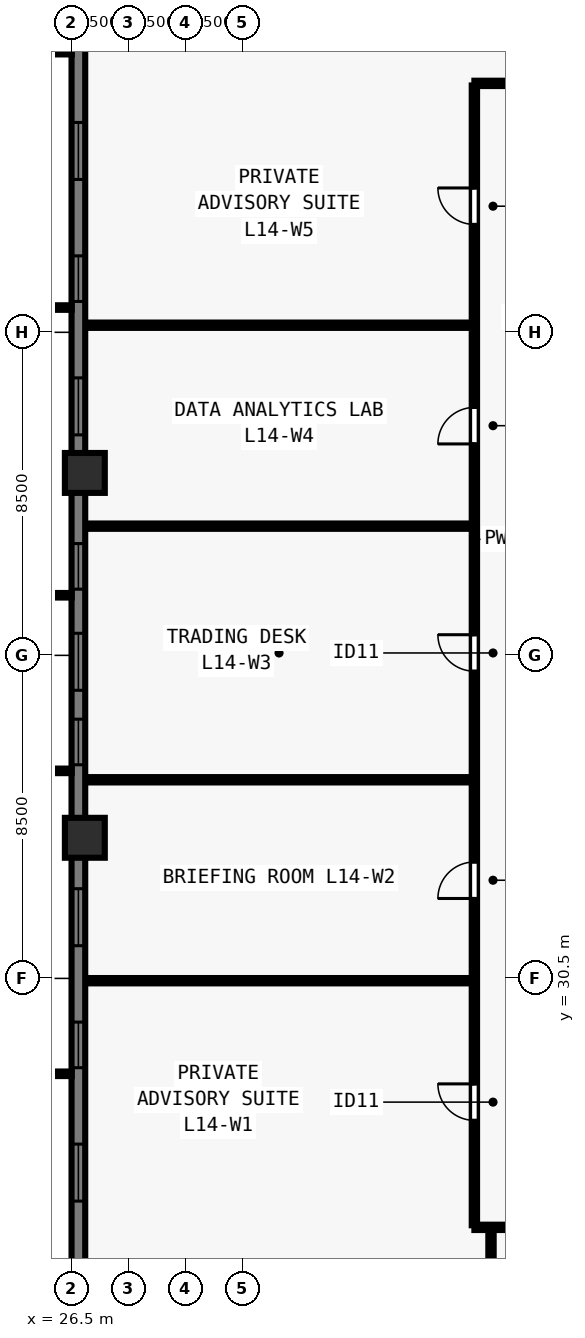
"""IFC4 building model, lengths in metres.
Left out: names, types, materials, properties, quantities, classifications, styles, units other than length and angle.
Written with IfcOpenShell. Run it as: python <this file> out.ifc"""

import sys

from ifc_helpers import new_model, si_unit, direction, frame, frame_2d, origin, origin_2d, place, context, subcontext, project, spatial, rectangle, extrude, element, fill, save


model = new_model("IFC4")
c1 = context("Model", 3, precision=1e-05, world=origin(), true_north=direction((0.0, 1.0)))
c2 = subcontext(c1, "Body", "Model", "MODEL_VIEW")
j1 = project(units=[si_unit("LENGTHUNIT", "METRE"), si_unit("PLANEANGLEUNIT", "RADIAN")], contexts=[c1])
p1 = place(None, origin())
s1 = spatial("IfcSite", under=j1, at=p1, CompositionType="ELEMENT")
p2 = place(p1, origin())
s2 = spatial("IfcBuilding", under=s1, at=p2, CompositionType="ELEMENT")
p3 = place(p2, frame((0.0, 0.0, 55.0)))
s3 = spatial("IfcBuildingStorey", under=s2, at=p3, CompositionType="ELEMENT", Elevation=55.0)
for number, where, z_axis, x_axis in (
    (1, (26.85, 43.8, 0.0), (0.0, 0.0, 1.0), (0.0, 1.0, 0.0)),
    (2, (26.85, 34.2, 0.0), (0.0, 0.0, 1.0), (0.0, 1.0, 0.0)),
):
    element("IfcColumn", number, at=place(p3, frame(where, z_axis=z_axis, x_axis=x_axis)), inside=s3, PredefinedType="COLUMN", context=c2, shape_type="SweptSolid", body=[
        extrude(rectangle(XDim=1.05, YDim=1.05, at=origin_2d()), origin(), (0.0, 0.0, 1.0), 3.5),
    ])
p4 = place(p3, frame((26.68, 16.5, 0.0), z_axis=(0.0, 0.0, 1.0), x_axis=(0.0, 1.0, 0.0)))
e3 = element("IfcWall", 3, at=p4, inside=s3, PredefinedType="SOLIDWALL", context=c2, shape_type="SweptSolid", body=[
    extrude(rectangle(XDim=44.662, YDim=0.36, at=frame_2d((22.331, 0.0))), origin(), (0.0, 0.0, 1.0), 3.28),
])
p5 = place(p4, frame((4.93, 0.0, 0.8)))
e4 = element("IfcOpeningElement", 4, at=p5, cuts=e3, PredefinedType="OPENING", context=c2, shape_type="SweptSolid", body=[
    extrude(rectangle(XDim=1.2, YDim=1.544, at=frame_2d((0.6, 0.772))), frame((0.0, 0.19, 0.0), z_axis=(0.0, -1.0, 0.0), x_axis=(1.0, 0.0, 0.0)), (0.0, 0.0, 1.0), 0.38),
])
p6 = place(p4, frame((8.14, 0.0, 0.8)))
e5 = element("IfcOpeningElement", 5, at=p6, cuts=e3, PredefinedType="OPENING", context=c2, shape_type="SweptSolid", body=[
    extrude(rectangle(XDim=1.5, YDim=1.544, at=frame_2d((0.75, 0.772))), frame((0.0, 0.19, 0.0), z_axis=(0.0, -1.0, 0.0), x_axis=(1.0, 0.0, 0.0)), (0.0, 0.0, 1.0), 0.38),
])
p7 = place(p4, frame((11.65, 0.0, 0.8)))
e6 = element("IfcOpeningElement", 6, at=p7, cuts=e3, PredefinedType="OPENING", context=c2, shape_type="SweptSolid", body=[
    extrude(rectangle(XDim=1.2, YDim=1.544, at=frame_2d((0.6, 0.772))), frame((0.0, 0.19, 0.0), z_axis=(0.0, -1.0, 0.0), x_axis=(1.0, 0.0, 0.0)), (0.0, 0.0, 1.0), 0.38),
])
p8 = place(p4, frame((14.861, 0.0, 0.8)))
e7 = element("IfcOpeningElement", 7, at=p8, cuts=e3, PredefinedType="OPENING", context=c2, shape_type="SweptSolid", body=[
    extrude(rectangle(XDim=1.5, YDim=1.544, at=frame_2d((0.75, 0.772))), frame((0.0, 0.19, 0.0), z_axis=(0.0, -1.0, 0.0), x_axis=(1.0, 0.0, 0.0)), (0.0, 0.0, 1.0), 0.38),
])
p9 = place(p4, frame((19.621, 0.0, 0.8)))
e8 = element("IfcOpeningElement", 8, at=p9, cuts=e3, PredefinedType="OPENING", context=c2, shape_type="SweptSolid", body=[
    extrude(rectangle(XDim=1.2, YDim=1.544, at=frame_2d((0.6, 0.772))), frame((0.0, 0.19, 0.0), z_axis=(0.0, -1.0, 0.0), x_axis=(1.0, 0.0, 0.0)), (0.0, 0.0, 1.0), 0.38),
])
p10 = place(p4, frame((21.581, 0.0, 0.8)))
e9 = element("IfcOpeningElement", 9, at=p10, cuts=e3, PredefinedType="OPENING", context=c2, shape_type="SweptSolid", body=[
    extrude(rectangle(XDim=1.5, YDim=1.544, at=frame_2d((0.75, 0.772))), frame((0.0, 0.19, 0.0), z_axis=(0.0, -1.0, 0.0), x_axis=(1.0, 0.0, 0.0)), (0.0, 0.0, 1.0), 0.38),
])
p11 = place(p4, frame((24.241, 0.0, 0.8)))
e10 = element("IfcOpeningElement", 10, at=p11, cuts=e3, PredefinedType="OPENING", context=c2, shape_type="SweptSolid", body=[
    extrude(rectangle(XDim=1.2, YDim=1.544, at=frame_2d((0.6, 0.772))), frame((0.0, 0.19, 0.0), z_axis=(0.0, -1.0, 0.0), x_axis=(1.0, 0.0, 0.0)), (0.0, 0.0, 1.0), 0.38),
])
p12 = place(p4, frame((28.302, 0.0, 0.8)))
e11 = element("IfcOpeningElement", 11, at=p12, cuts=e3, PredefinedType="OPENING", context=c2, shape_type="SweptSolid", body=[
    extrude(rectangle(XDim=1.5, YDim=1.544, at=frame_2d((0.75, 0.772))), frame((0.0, 0.19, 0.0), z_axis=(0.0, -1.0, 0.0), x_axis=(1.0, 0.0, 0.0)), (0.0, 0.0, 1.0), 0.38),
])
p13 = place(p4, frame((31.812, 0.0, 0.8)))
e12 = element("IfcOpeningElement", 12, at=p13, cuts=e3, PredefinedType="OPENING", context=c2, shape_type="SweptSolid", body=[
    extrude(rectangle(XDim=1.2, YDim=1.544, at=frame_2d((0.6, 0.772))), frame((0.0, 0.19, 0.0), z_axis=(0.0, -1.0, 0.0), x_axis=(1.0, 0.0, 0.0)), (0.0, 0.0, 1.0), 0.38),
])
p14 = place(p4, frame((35.022, 0.0, 0.8)))
e13 = element("IfcOpeningElement", 13, at=p14, cuts=e3, PredefinedType="OPENING", context=c2, shape_type="SweptSolid", body=[
    extrude(rectangle(XDim=1.5, YDim=1.544, at=frame_2d((0.75, 0.772))), frame((0.0, 0.19, 0.0), z_axis=(0.0, -1.0, 0.0), x_axis=(1.0, 0.0, 0.0)), (0.0, 0.0, 1.0), 0.38),
])
p15 = place(p4, frame((38.532, 0.0, 0.8)))
e14 = element("IfcOpeningElement", 14, at=p15, cuts=e3, PredefinedType="OPENING", context=c2, shape_type="SweptSolid", body=[
    extrude(rectangle(XDim=1.2, YDim=1.544, at=frame_2d((0.6, 0.772))), frame((0.0, 0.19, 0.0), z_axis=(0.0, -1.0, 0.0), x_axis=(1.0, 0.0, 0.0)), (0.0, 0.0, 1.0), 0.38),
])
p16 = place(p3, frame((37.1, 23.95, 0.0), z_axis=(0.0, 0.0, 1.0), x_axis=(1.0, 0.0, 0.0)))
e15 = element("IfcWall", 15, at=p16, inside=s3, PredefinedType="PARTITIONING", context=c2, shape_type="SweptSolid", body=[
    extrude(rectangle(XDim=29.8, YDim=0.14, at=frame_2d((14.9, 0.0))), origin(), (0.0, 0.0, 1.0), 3.28),
])
p17 = place(p16, frame((4.191, 0.0, 0.0)))
e16 = element("IfcOpeningElement", 16, at=p17, cuts=e15, PredefinedType="OPENING", context=c2, shape_type="SweptSolid", body=[
    extrude(rectangle(XDim=0.96, YDim=2.12, at=frame_2d((0.48, 1.06))), frame((0.0, 0.08, 0.0), z_axis=(0.0, -1.0, 0.0), x_axis=(1.0, 0.0, 0.0)), (0.0, 0.0, 1.0), 0.16),
])
p18 = place(p16, frame((5.358, 0.0, 0.0)))
e17 = element("IfcOpeningElement", 17, at=p18, cuts=e15, PredefinedType="OPENING", context=c2, shape_type="SweptSolid", body=[
    extrude(rectangle(XDim=0.96, YDim=2.12, at=frame_2d((0.48, 1.06))), frame((0.0, 0.08, 0.0), z_axis=(0.0, -1.0, 0.0), x_axis=(1.0, 0.0, 0.0)), (0.0, 0.0, 1.0), 0.16),
])
p19 = place(p16, frame((14.51, 0.0, 0.0)))
e18 = element("IfcOpeningElement", 18, at=p19, cuts=e15, PredefinedType="OPENING", context=c2, shape_type="SweptSolid", body=[
    extrude(rectangle(XDim=0.96, YDim=2.12, at=frame_2d((0.48, 1.06))), frame((0.0, 0.08, 0.0), z_axis=(0.0, -1.0, 0.0), x_axis=(1.0, 0.0, 0.0)), (0.0, 0.0, 1.0), 0.16),
])
p20 = place(p16, frame((24.542, 0.0, 0.0)))
e19 = element("IfcOpeningElement", 19, at=p20, cuts=e15, PredefinedType="OPENING", context=c2, shape_type="SweptSolid", body=[
    extrude(rectangle(XDim=0.96, YDim=2.12, at=frame_2d((0.48, 1.06))), frame((0.0, 0.08, 0.0), z_axis=(0.0, -1.0, 0.0), x_axis=(1.0, 0.0, 0.0)), (0.0, 0.0, 1.0), 0.16),
])
p21 = place(p16, frame((28.26, 0.0, 0.0)))
e20 = element("IfcOpeningElement", 20, at=p21, cuts=e15, PredefinedType="OPENING", context=c2, shape_type="SweptSolid", body=[
    extrude(rectangle(XDim=0.96, YDim=2.12, at=frame_2d((0.48, 1.06))), frame((0.0, 0.08, 0.0), z_axis=(0.0, -1.0, 0.0), x_axis=(1.0, 0.0, 0.0)), (0.0, 0.0, 1.0), 0.16),
])
p22 = place(p3, frame((37.1, 54.05, 0.0), z_axis=(0.0, 0.0, 1.0), x_axis=(1.0, 0.0, 0.0)))
e21 = element("IfcWall", 21, at=p22, inside=s3, PredefinedType="PARTITIONING", context=c2, shape_type="SweptSolid", body=[
    extrude(rectangle(XDim=29.8, YDim=0.14, at=frame_2d((14.9, 0.0))), origin(), (0.0, 0.0, 1.0), 3.28),
])
p23 = place(p22, frame((3.522, 0.0, 0.0)))
e22 = element("IfcOpeningElement", 22, at=p23, cuts=e21, PredefinedType="OPENING", context=c2, shape_type="SweptSolid", body=[
    extrude(rectangle(XDim=0.96, YDim=2.12, at=frame_2d((0.48, 1.06))), frame((0.0, 0.08, 0.0), z_axis=(0.0, -1.0, 0.0), x_axis=(1.0, 0.0, 0.0)), (0.0, 0.0, 1.0), 0.16),
])
p24 = place(p22, frame((8.06, 0.0, 0.0)))
e23 = element("IfcOpeningElement", 23, at=p24, cuts=e21, PredefinedType="OPENING", context=c2, shape_type="SweptSolid", body=[
    extrude(rectangle(XDim=0.96, YDim=2.12, at=frame_2d((0.48, 1.06))), frame((0.0, 0.08, 0.0), z_axis=(0.0, -1.0, 0.0), x_axis=(1.0, 0.0, 0.0)), (0.0, 0.0, 1.0), 0.16),
])
p25 = place(p22, frame((20.6, 0.0, 0.0)))
e24 = element("IfcOpeningElement", 24, at=p25, cuts=e21, PredefinedType="OPENING", context=c2, shape_type="SweptSolid", body=[
    extrude(rectangle(XDim=0.96, YDim=2.12, at=frame_2d((0.48, 1.06))), frame((0.0, 0.08, 0.0), z_axis=(0.0, -1.0, 0.0), x_axis=(1.0, 0.0, 0.0)), (0.0, 0.0, 1.0), 0.16),
])
p26 = place(p22, frame((28.48, 0.0, 0.0)))
e25 = element("IfcOpeningElement", 25, at=p26, cuts=e21, PredefinedType="OPENING", context=c2, shape_type="SweptSolid", body=[
    extrude(rectangle(XDim=0.96, YDim=2.12, at=frame_2d((0.48, 1.06))), frame((0.0, 0.08, 0.0), z_axis=(0.0, -1.0, 0.0), x_axis=(1.0, 0.0, 0.0)), (0.0, 0.0, 1.0), 0.16),
])
p27 = place(p3, frame((37.1, 24.005, 0.0), z_axis=(0.0, 0.0, 1.0), x_axis=(0.0, 1.0, 0.0)))
e26 = element("IfcWall", 26, at=p27, inside=s3, PredefinedType="PARTITIONING", context=c2, shape_type="SweptSolid", body=[
    extrude(rectangle(XDim=29.99, YDim=0.14, at=frame_2d((14.995, 0.0))), origin(), (0.0, 0.0, 1.0), 3.28),
])
p28 = place(p27, frame((2.76, 0.0, 0.0)))
e27 = element("IfcOpeningElement", 27, at=p28, cuts=e26, PredefinedType="OPENING", context=c2, shape_type="SweptSolid", body=[
    extrude(rectangle(XDim=0.96, YDim=2.12, at=frame_2d((0.48, 1.06))), frame((0.0, 0.08, 0.0), z_axis=(0.0, -1.0, 0.0), x_axis=(1.0, 0.0, 0.0)), (0.0, 0.0, 1.0), 0.16),
])
p29 = place(p27, frame((8.598, 0.0, 0.0)))
e28 = element("IfcOpeningElement", 28, at=p29, cuts=e26, PredefinedType="OPENING", context=c2, shape_type="SweptSolid", body=[
    extrude(rectangle(XDim=0.96, YDim=2.12, at=frame_2d((0.48, 1.06))), frame((0.0, 0.08, 0.0), z_axis=(0.0, -1.0, 0.0), x_axis=(1.0, 0.0, 0.0)), (0.0, 0.0, 1.0), 0.16),
])
p30 = place(p27, frame((14.578, 0.0, 0.0)))
e29 = element("IfcOpeningElement", 29, at=p30, cuts=e26, PredefinedType="OPENING", context=c2, shape_type="SweptSolid", body=[
    extrude(rectangle(XDim=0.96, YDim=2.12, at=frame_2d((0.48, 1.06))), frame((0.0, 0.08, 0.0), z_axis=(0.0, -1.0, 0.0), x_axis=(1.0, 0.0, 0.0)), (0.0, 0.0, 1.0), 0.16),
])
p31 = place(p27, frame((20.558, 0.0, 0.0)))
e30 = element("IfcOpeningElement", 30, at=p31, cuts=e26, PredefinedType="OPENING", context=c2, shape_type="SweptSolid", body=[
    extrude(rectangle(XDim=0.96, YDim=2.12, at=frame_2d((0.48, 1.06))), frame((0.0, 0.08, 0.0), z_axis=(0.0, -1.0, 0.0), x_axis=(1.0, 0.0, 0.0)), (0.0, 0.0, 1.0), 0.16),
])
p32 = place(p27, frame((26.333, 0.0, 0.0)))
e31 = element("IfcOpeningElement", 31, at=p32, cuts=e26, PredefinedType="OPENING", context=c2, shape_type="SweptSolid", body=[
    extrude(rectangle(XDim=0.96, YDim=2.12, at=frame_2d((0.48, 1.06))), frame((0.0, 0.08, 0.0), z_axis=(0.0, -1.0, 0.0), x_axis=(1.0, 0.0, 0.0)), (0.0, 0.0, 1.0), 0.16),
])
p33 = place(p3, frame((37.537, 13.92, 0.0), z_axis=(0.0, 0.0, 1.0), x_axis=(0.0, 1.0, 0.0)))
e32 = element("IfcWall", 32, at=p33, inside=s3, PredefinedType="PARTITIONING", context=c2, shape_type="SweptSolid", body=[
    extrude(rectangle(XDim=9.93, YDim=0.14, at=frame_2d((4.965, 0.0))), origin(), (0.0, 0.0, 1.0), 2.439),
])
p34 = place(p3, frame((26.92, 30.439, 0.0), z_axis=(0.0, 0.0, 1.0), x_axis=(1.0, 0.0, 0.0)))
e33 = element("IfcWall", 33, at=p34, inside=s3, PredefinedType="PARTITIONING", context=c2, shape_type="SweptSolid", body=[
    extrude(rectangle(XDim=10.08, YDim=0.14, at=frame_2d((5.04, 0.0))), origin(), (0.0, 0.0, 1.0), 3.28),
])
p35 = place(p3, frame((26.92, 35.727, 0.0), z_axis=(0.0, 0.0, 1.0), x_axis=(1.0, 0.0, 0.0)))
e34 = element("IfcWall", 34, at=p35, inside=s3, PredefinedType="PARTITIONING", context=c2, shape_type="SweptSolid", body=[
    extrude(rectangle(XDim=10.08, YDim=0.14, at=frame_2d((5.04, 0.0))), origin(), (0.0, 0.0, 1.0), 2.849),
])
for number, where, z_axis, x_axis in (
    (35, (26.92, 42.399, 0.0), (0.0, 0.0, 1.0), (1.0, 0.0, 0.0)),
    (36, (26.92, 47.687, 0.0), (0.0, 0.0, 1.0), (1.0, 0.0, 0.0)),
):
    element("IfcWall", number, at=place(p3, frame(where, z_axis=z_axis, x_axis=x_axis)), inside=s3, PredefinedType="PARTITIONING", context=c2, shape_type="SweptSolid", body=[
        extrude(rectangle(XDim=10.08, YDim=0.14, at=frame_2d((5.04, 0.0))), origin(), (0.0, 0.0, 1.0), 3.28),
    ])
p36 = place(p6, origin())
e37 = element("IfcWindow", 37, at=p36, inside=s3, PartitioningType="SINGLE_PANEL", PredefinedType="WINDOW", context=c2, shape_type="SweptSolid", body=[
    extrude(rectangle(XDim=1.5, YDim=1.544, at=frame_2d((0.75, 0.772))), frame((0.0, -0.05, 0.0), z_axis=(0.0, -1.0, 0.0), x_axis=(1.0, 0.0, 0.0)), (0.0, 0.0, 1.0), 0.06),
])
fill(e5, e37)
p37 = place(p7, origin())
e38 = element("IfcWindow", 38, at=p37, inside=s3, PartitioningType="SINGLE_PANEL", PredefinedType="WINDOW", context=c2, shape_type="SweptSolid", body=[
    extrude(rectangle(XDim=1.2, YDim=1.544, at=frame_2d((0.6, 0.772))), frame((0.0, -0.05, 0.0), z_axis=(0.0, -1.0, 0.0), x_axis=(1.0, 0.0, 0.0)), (0.0, 0.0, 1.0), 0.06),
])
fill(e6, e38)
p38 = place(p8, origin())
e39 = element("IfcWindow", 39, at=p38, inside=s3, PartitioningType="SINGLE_PANEL", PredefinedType="WINDOW", context=c2, shape_type="SweptSolid", body=[
    extrude(rectangle(XDim=1.5, YDim=1.544, at=frame_2d((0.75, 0.772))), frame((0.0, -0.05, 0.0), z_axis=(0.0, -1.0, 0.0), x_axis=(1.0, 0.0, 0.0)), (0.0, 0.0, 1.0), 0.06),
])
fill(e7, e39)
p39 = place(p9, origin())
e40 = element("IfcWindow", 40, at=p39, inside=s3, PartitioningType="SINGLE_PANEL", PredefinedType="WINDOW", context=c2, shape_type="SweptSolid", body=[
    extrude(rectangle(XDim=1.2, YDim=1.544, at=frame_2d((0.6, 0.772))), frame((0.0, -0.05, 0.0), z_axis=(0.0, -1.0, 0.0), x_axis=(1.0, 0.0, 0.0)), (0.0, 0.0, 1.0), 0.06),
])
fill(e8, e40)
p40 = place(p10, origin())
e41 = element("IfcWindow", 41, at=p40, inside=s3, PartitioningType="SINGLE_PANEL", PredefinedType="WINDOW", context=c2, shape_type="SweptSolid", body=[
    extrude(rectangle(XDim=1.5, YDim=1.544, at=frame_2d((0.75, 0.772))), frame((0.0, -0.05, 0.0), z_axis=(0.0, -1.0, 0.0), x_axis=(1.0, 0.0, 0.0)), (0.0, 0.0, 1.0), 0.06),
])
fill(e9, e41)
p41 = place(p11, origin())
e42 = element("IfcWindow", 42, at=p41, inside=s3, PartitioningType="SINGLE_PANEL", PredefinedType="WINDOW", context=c2, shape_type="SweptSolid", body=[
    extrude(rectangle(XDim=1.2, YDim=1.544, at=frame_2d((0.6, 0.772))), frame((0.0, -0.05, 0.0), z_axis=(0.0, -1.0, 0.0), x_axis=(1.0, 0.0, 0.0)), (0.0, 0.0, 1.0), 0.06),
])
fill(e10, e42)
p42 = place(p12, origin())
e43 = element("IfcWindow", 43, at=p42, inside=s3, PartitioningType="SINGLE_PANEL", PredefinedType="WINDOW", context=c2, shape_type="SweptSolid", body=[
    extrude(rectangle(XDim=1.5, YDim=1.544, at=frame_2d((0.75, 0.772))), frame((0.0, -0.05, 0.0), z_axis=(0.0, -1.0, 0.0), x_axis=(1.0, 0.0, 0.0)), (0.0, 0.0, 1.0), 0.06),
])
fill(e11, e43)
p43 = place(p13, origin())
e44 = element("IfcWindow", 44, at=p43, inside=s3, PartitioningType="SINGLE_PANEL", PredefinedType="WINDOW", context=c2, shape_type="SweptSolid", body=[
    extrude(rectangle(XDim=1.2, YDim=1.544, at=frame_2d((0.6, 0.772))), frame((0.0, -0.05, 0.0), z_axis=(0.0, -1.0, 0.0), x_axis=(1.0, 0.0, 0.0)), (0.0, 0.0, 1.0), 0.06),
])
fill(e12, e44)
p44 = place(p14, origin())
e45 = element("IfcWindow", 45, at=p44, inside=s3, PartitioningType="SINGLE_PANEL", PredefinedType="WINDOW", context=c2, shape_type="SweptSolid", body=[
    extrude(rectangle(XDim=1.5, YDim=1.544, at=frame_2d((0.75, 0.772))), frame((0.0, -0.05, 0.0), z_axis=(0.0, -1.0, 0.0), x_axis=(1.0, 0.0, 0.0)), (0.0, 0.0, 1.0), 0.06),
])
fill(e13, e45)
p45 = place(p28, origin())
e46 = element("IfcDoor", 46, at=p45, inside=s3, OperationType="SINGLE_SWING_RIGHT", PredefinedType="DOOR", context=c2, shape_type="SweptSolid", body=[
    extrude(rectangle(XDim=0.96, YDim=2.12, at=frame_2d((0.48, 1.06))), frame((0.0, 0.025, 0.0), z_axis=(0.0, -1.0, 0.0), x_axis=(1.0, 0.0, 0.0)), (0.0, 0.0, 1.0), 0.05),
])
fill(e27, e46)
p46 = place(p29, origin())
e47 = element("IfcDoor", 47, at=p46, inside=s3, OperationType="SINGLE_SWING_LEFT", PredefinedType="DOOR", context=c2, shape_type="SweptSolid", body=[
    extrude(rectangle(XDim=0.96, YDim=2.12, at=frame_2d((0.48, 1.06))), frame((0.0, 0.025, 0.0), z_axis=(0.0, -1.0, 0.0), x_axis=(1.0, 0.0, 0.0)), (0.0, 0.0, 1.0), 0.05),
])
fill(e28, e47)
p47 = place(p30, origin())
e48 = element("IfcDoor", 48, at=p47, inside=s3, OperationType="SINGLE_SWING_RIGHT", PredefinedType="DOOR", context=c2, shape_type="SweptSolid", body=[
    extrude(rectangle(XDim=0.96, YDim=2.12, at=frame_2d((0.48, 1.06))), frame((0.0, 0.025, 0.0), z_axis=(0.0, -1.0, 0.0), x_axis=(1.0, 0.0, 0.0)), (0.0, 0.0, 1.0), 0.05),
])
fill(e29, e48)
p48 = place(p31, origin())
e49 = element("IfcDoor", 49, at=p48, inside=s3, OperationType="SINGLE_SWING_LEFT", PredefinedType="DOOR", context=c2, shape_type="SweptSolid", body=[
    extrude(rectangle(XDim=0.96, YDim=2.12, at=frame_2d((0.48, 1.06))), frame((0.0, 0.025, 0.0), z_axis=(0.0, -1.0, 0.0), x_axis=(1.0, 0.0, 0.0)), (0.0, 0.0, 1.0), 0.05),
])
fill(e30, e49)
p49 = place(p32, origin())
e50 = element("IfcDoor", 50, at=p49, inside=s3, OperationType="SINGLE_SWING_RIGHT", PredefinedType="DOOR", context=c2, shape_type="SweptSolid", body=[
    extrude(rectangle(XDim=0.96, YDim=2.12, at=frame_2d((0.48, 1.06))), frame((0.0, 0.025, 0.0), z_axis=(0.0, -1.0, 0.0), x_axis=(1.0, 0.0, 0.0)), (0.0, 0.0, 1.0), 0.05),
])
fill(e31, e50)
save(model, sys.argv[1])
